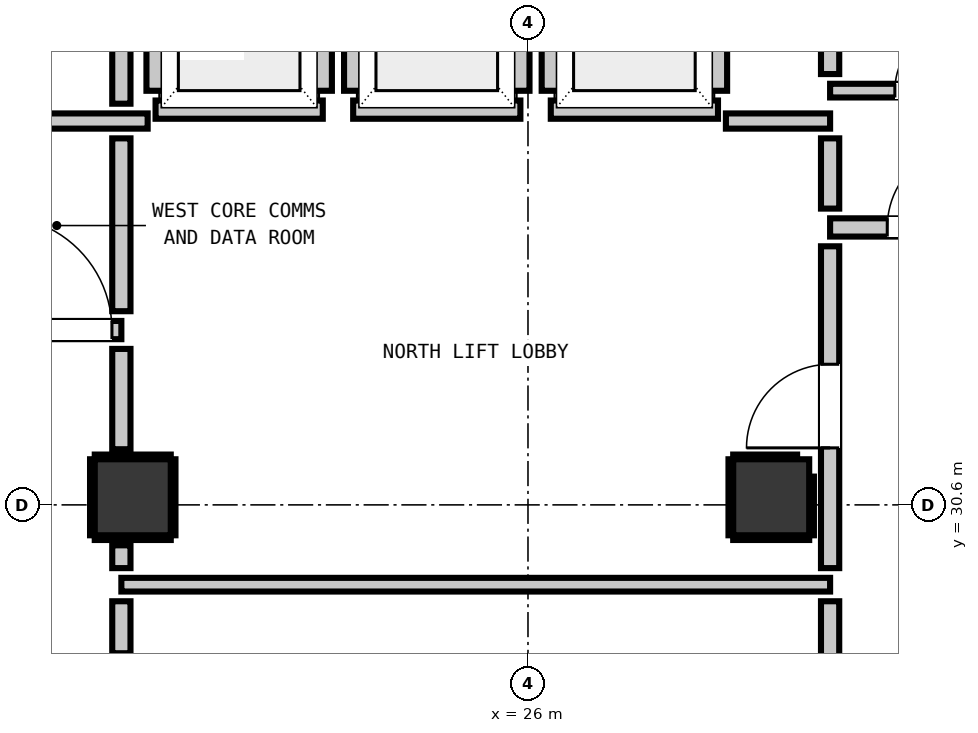
"""IFC4 building model, lengths in metres.
Left out: names, types, materials, properties, quantities, classifications, styles, units other than length and angle.
Written with IfcOpenShell. Run it as: python <this file> out.ifc"""

import sys

from ifc_helpers import new_model, si_unit, direction, frame, frame_2d, origin, origin_2d, place, context, subcontext, project, spatial, rectangle, extrude, element, fill, save


model = new_model("IFC4")
c1 = context("Model", 3, precision=1e-05, world=origin(), true_north=direction((0.0, 1.0)))
c2 = subcontext(c1, "Body", "Model", "MODEL_VIEW")
j1 = project(units=[si_unit("LENGTHUNIT", "METRE"), si_unit("PLANEANGLEUNIT", "RADIAN")], contexts=[c1])
p1 = place(None, origin())
s1 = spatial("IfcSite", under=j1, at=p1, CompositionType="ELEMENT")
p2 = place(p1, origin())
s2 = spatial("IfcBuilding", under=s1, at=p2, CompositionType="ELEMENT")
p3 = place(p2, frame((0.0, 0.0, 22.0)))
s3 = spatial("IfcBuildingStorey", under=s2, at=p3, CompositionType="ELEMENT", Elevation=22.0)
for number, where, z_axis, x_axis in (
    (1, (20.8, 30.7, 0.0), (0.0, 0.0, 1.0), (1.0, 0.0, 0.0)),
    (2, (29.2, 30.7, 0.0), (0.0, 0.0, 1.0), (1.0, 0.0, 0.0)),
):
    element("IfcColumn", number, at=place(p3, frame(where, z_axis=z_axis, x_axis=x_axis)), inside=s3, PredefinedType="COLUMN", context=c2, shape_type="SweptSolid", body=[
        extrude(rectangle(XDim=1.0, YDim=1.0, at=origin_2d()), origin(), (0.0, 0.0, 1.0), 3.32),
    ])
p4 = place(p3, frame((21.1, 35.8, 0.0), z_axis=(0.0, 0.0, 1.0), x_axis=(1.0, 0.0, 0.0)))
e3 = element("IfcWall", 3, at=p4, inside=s3, PredefinedType="PARTITIONING", context=c2, shape_type="SweptSolid", body=[
    extrude(rectangle(XDim=2.2, YDim=0.24, at=frame_2d((1.1, 0.0))), origin(), (0.0, 0.0, 1.0), 3.06),
])
p5 = place(p3, frame((21.1, 36.048, 0.0), z_axis=(0.0, 0.0, 1.0), x_axis=(0.0, 1.0, 0.0)))
e4 = element("IfcWall", 4, at=p5, inside=s3, PredefinedType="PARTITIONING", context=c2, shape_type="SweptSolid", body=[
    extrude(rectangle(XDim=2.104, YDim=0.24, at=frame_2d((1.052, 0.0))), origin(), (0.0, 0.0, 1.0), 2.295),
])
p6 = place(p3, frame((23.3, 36.048, 0.0), z_axis=(0.0, 0.0, 1.0), x_axis=(0.0, 1.0, 0.0)))
e5 = element("IfcWall", 5, at=p6, inside=s3, PredefinedType="PARTITIONING", context=c2, shape_type="SweptSolid", body=[
    extrude(rectangle(XDim=2.104, YDim=0.24, at=frame_2d((1.052, 0.0))), origin(), (0.0, 0.0, 1.0), 3.06),
])
p7 = place(p3, frame((23.7, 35.8, 0.0), z_axis=(0.0, 0.0, 1.0), x_axis=(1.0, 0.0, 0.0)))
e6 = element("IfcWall", 6, at=p7, inside=s3, PredefinedType="PARTITIONING", context=c2, shape_type="SweptSolid", body=[
    extrude(rectangle(XDim=2.2, YDim=0.24, at=frame_2d((1.1, 0.0))), origin(), (0.0, 0.0, 1.0), 3.06),
])
for number, where, z_axis, x_axis in (
    (7, (23.7, 36.048, 0.0), (0.0, 0.0, 1.0), (0.0, 1.0, 0.0)),
    (8, (25.9, 36.048, 0.0), (0.0, 0.0, 1.0), (0.0, 1.0, 0.0)),
):
    element("IfcWall", number, at=place(p3, frame(where, z_axis=z_axis, x_axis=x_axis)), inside=s3, PredefinedType="PARTITIONING", context=c2, shape_type="SweptSolid", body=[
        extrude(rectangle(XDim=2.104, YDim=0.24, at=frame_2d((1.052, 0.0))), origin(), (0.0, 0.0, 1.0), 3.06),
    ])
p8 = place(p3, frame((26.3, 35.8, 0.0), z_axis=(0.0, 0.0, 1.0), x_axis=(1.0, 0.0, 0.0)))
e9 = element("IfcWall", 9, at=p8, inside=s3, PredefinedType="PARTITIONING", context=c2, shape_type="SweptSolid", body=[
    extrude(rectangle(XDim=2.2, YDim=0.24, at=frame_2d((1.1, 0.0))), origin(), (0.0, 0.0, 1.0), 3.06),
])
for number, where, z_axis, x_axis in (
    (10, (26.3, 36.048, 0.0), (0.0, 0.0, 1.0), (0.0, 1.0, 0.0)),
    (11, (28.5, 36.048, 0.0), (0.0, 0.0, 1.0), (0.0, 1.0, 0.0)),
):
    element("IfcWall", number, at=place(p3, frame(where, z_axis=z_axis, x_axis=x_axis)), inside=s3, PredefinedType="PARTITIONING", context=c2, shape_type="SweptSolid", body=[
        extrude(rectangle(XDim=2.104, YDim=0.24, at=frame_2d((1.052, 0.0))), origin(), (0.0, 0.0, 1.0), 3.06),
    ])
p9 = place(p3, frame((17.45, 32.9, 0.0), z_axis=(0.0, 0.0, 1.0), x_axis=(1.0, 0.0, 0.0)))
e12 = element("IfcWall", 12, at=p9, inside=s3, PredefinedType="PARTITIONING", context=c2, shape_type="SweptSolid", body=[
    extrude(rectangle(XDim=3.2, YDim=0.24, at=frame_2d((1.6, 0.0))), origin(), (0.0, 0.0, 1.0), 3.06),
])
p10 = place(p9, frame((0.159, 0.0, 0.0)))
e13 = element("IfcOpeningElement", 13, at=p10, cuts=e12, PredefinedType="OPENING", context=c2, shape_type="SweptSolid", body=[
    extrude(rectangle(XDim=1.1, YDim=2.15, at=frame_2d((0.55, 1.075))), frame((0.0, 0.13, 0.0), z_axis=(0.0, -1.0, 0.0), x_axis=(1.0, 0.0, 0.0)), (0.0, 0.0, 1.0), 0.26),
])
p11 = place(p9, frame((1.576, 0.0, 0.0)))
e14 = element("IfcOpeningElement", 14, at=p11, cuts=e12, PredefinedType="OPENING", context=c2, shape_type="SweptSolid", body=[
    extrude(rectangle(XDim=1.5, YDim=2.15, at=frame_2d((0.75, 1.075))), frame((0.0, 0.13, 0.0), z_axis=(0.0, -1.0, 0.0), x_axis=(1.0, 0.0, 0.0)), (0.0, 0.0, 1.0), 0.26),
])
p12 = place(p3, frame((29.975, 34.25, 0.0), z_axis=(0.0, 0.0, 1.0), x_axis=(1.0, 0.0, 0.0)))
e15 = element("IfcWall", 15, at=p12, inside=s3, PredefinedType="PARTITIONING", context=c2, shape_type="SweptSolid", body=[
    extrude(rectangle(XDim=2.475, YDim=0.24, at=frame_2d((1.237, 0.0))), origin(), (0.0, 0.0, 1.0), 3.06),
])
p13 = place(p12, frame((0.752, 0.0, 0.0)))
e16 = element("IfcOpeningElement", 16, at=p13, cuts=e15, PredefinedType="OPENING", context=c2, shape_type="SweptSolid", body=[
    extrude(rectangle(XDim=1.1, YDim=2.15, at=frame_2d((0.55, 1.075))), frame((0.0, 0.13, 0.0), z_axis=(0.0, -1.0, 0.0), x_axis=(1.0, 0.0, 0.0)), (0.0, 0.0, 1.0), 0.26),
])
p14 = place(p3, frame((18.95, 35.65, 0.0), z_axis=(0.0, 0.0, 1.0), x_axis=(1.0, 0.0, 0.0)))
e17 = element("IfcWall", 17, at=p14, inside=s3, PredefinedType="PARTITIONING", context=c2, shape_type="SweptSolid", body=[
    extrude(rectangle(XDim=2.046, YDim=0.2, at=frame_2d((1.023, 0.0))), origin(), (0.0, 0.0, 1.0), 3.06),
])
p15 = place(p3, frame((28.604, 35.65, 0.0), z_axis=(0.0, 0.0, 1.0), x_axis=(1.0, 0.0, 0.0)))
e18 = element("IfcWall", 18, at=p15, inside=s3, PredefinedType="PARTITIONING", context=c2, shape_type="SweptSolid", body=[
    extrude(rectangle(XDim=1.371, YDim=0.2, at=frame_2d((0.686, 0.0))), origin(), (0.0, 0.0, 1.0), 3.06),
])
p16 = place(p3, frame((20.65, 29.55, 0.0), z_axis=(0.0, 0.0, 1.0), x_axis=(1.0, 0.0, 0.0)))
e19 = element("IfcWall", 19, at=p16, inside=s3, PredefinedType="PARTITIONING", context=c2, shape_type="SweptSolid", body=[
    extrude(rectangle(XDim=9.325, YDim=0.18, at=frame_2d((4.663, 0.0))), origin(), (0.0, 0.0, 1.0), 3.06),
])
p17 = place(p3, frame((29.975, 36.05, 0.0), z_axis=(0.0, 0.0, 1.0), x_axis=(1.0, 0.0, 0.0)))
e20 = element("IfcWall", 20, at=p17, inside=s3, PredefinedType="PARTITIONING", context=c2, shape_type="SweptSolid", body=[
    extrude(rectangle(XDim=2.505, YDim=0.18, at=frame_2d((1.252, 0.0))), origin(), (0.0, 0.0, 1.0), 3.06),
])
p18 = place(p17, frame((0.852, 0.0, 0.0)))
e21 = element("IfcOpeningElement", 21, at=p18, cuts=e20, PredefinedType="OPENING", context=c2, shape_type="SweptSolid", body=[
    extrude(rectangle(XDim=0.9, YDim=2.1, at=frame_2d((0.45, 1.05))), frame((0.0, 0.1, 0.0), z_axis=(0.0, -1.0, 0.0), x_axis=(1.0, 0.0, 0.0)), (0.0, 0.0, 1.0), 0.2),
])
p19 = place(p3, frame((20.65, 28.648, 0.0), z_axis=(0.0, 0.0, 1.0), x_axis=(0.0, 1.0, 0.0)))
e22 = element("IfcWall", 22, at=p19, inside=s3, PredefinedType="PARTITIONING", context=c2, shape_type="SweptSolid", body=[
    extrude(rectangle(XDim=0.684, YDim=0.24, at=frame_2d((0.342, 0.0))), origin(), (0.0, 0.0, 1.0), 2.295),
])
p20 = place(p3, frame((20.65, 29.768, 0.0), z_axis=(0.0, 0.0, 1.0), x_axis=(0.0, 1.0, 0.0)))
e23 = element("IfcWall", 23, at=p20, inside=s3, PredefinedType="PARTITIONING", context=c2, shape_type="SweptSolid", body=[
    extrude(rectangle(XDim=0.3, YDim=0.24, at=frame_2d((0.15, 0.0))), origin(), (0.0, 0.0, 1.0), 2.295),
])
p21 = place(p3, frame((20.65, 31.332, 0.0), z_axis=(0.0, 0.0, 1.0), x_axis=(0.0, 1.0, 0.0)))
e24 = element("IfcWall", 24, at=p21, inside=s3, PredefinedType="PARTITIONING", context=c2, shape_type="SweptSolid", body=[
    extrude(rectangle(XDim=1.32, YDim=0.24, at=frame_2d((0.66, 0.0))), origin(), (0.0, 0.0, 1.0), 2.295),
])
p22 = place(p3, frame((20.65, 33.148, 0.0), z_axis=(0.0, 0.0, 1.0), x_axis=(0.0, 1.0, 0.0)))
e25 = element("IfcWall", 25, at=p22, inside=s3, PredefinedType="PARTITIONING", context=c2, shape_type="SweptSolid", body=[
    extrude(rectangle(XDim=2.274, YDim=0.24, at=frame_2d((1.137, 0.0))), origin(), (0.0, 0.0, 1.0), 2.295),
])
p23 = place(p3, frame((20.65, 35.878, 0.0), z_axis=(0.0, 0.0, 1.0), x_axis=(0.0, 1.0, 0.0)))
e26 = element("IfcWall", 26, at=p23, inside=s3, PredefinedType="PARTITIONING", context=c2, shape_type="SweptSolid", body=[
    extrude(rectangle(XDim=2.674, YDim=0.24, at=frame_2d((1.337, 0.0))), origin(), (0.0, 0.0, 1.0), 2.295),
])
p24 = place(p3, frame((29.975, 25.648, 0.0), z_axis=(0.0, 0.0, 1.0), x_axis=(0.0, 1.0, 0.0)))
e27 = element("IfcWall", 27, at=p24, inside=s3, PredefinedType="PARTITIONING", context=c2, shape_type="SweptSolid", body=[
    extrude(rectangle(XDim=3.684, YDim=0.24, at=frame_2d((1.842, 0.0))), origin(), (0.0, 0.0, 1.0), 3.06),
])
p25 = place(p3, frame((29.975, 29.768, 0.0), z_axis=(0.0, 0.0, 1.0), x_axis=(0.0, 1.0, 0.0)))
e28 = element("IfcWall", 28, at=p25, inside=s3, PredefinedType="PARTITIONING", context=c2, shape_type="SweptSolid", body=[
    extrude(rectangle(XDim=4.234, YDim=0.24, at=frame_2d((2.117, 0.0))), origin(), (0.0, 0.0, 1.0), 3.06),
])
p26 = place(p25, frame((1.582, 0.0, 0.0)))
e29 = element("IfcOpeningElement", 29, at=p26, cuts=e28, PredefinedType="OPENING", context=c2, shape_type="SweptSolid", body=[
    extrude(rectangle(XDim=1.1, YDim=2.15, at=frame_2d((0.55, 1.075))), frame((0.0, 0.13, 0.0), z_axis=(0.0, -1.0, 0.0), x_axis=(1.0, 0.0, 0.0)), (0.0, 0.0, 1.0), 0.26),
])
p27 = place(p3, frame((29.975, 34.498, 0.0), z_axis=(0.0, 0.0, 1.0), x_axis=(0.0, 1.0, 0.0)))
e30 = element("IfcWall", 30, at=p27, inside=s3, PredefinedType="PARTITIONING", context=c2, shape_type="SweptSolid", body=[
    extrude(rectangle(XDim=0.924, YDim=0.24, at=frame_2d((0.462, 0.0))), origin(), (0.0, 0.0, 1.0), 3.06),
])
p28 = place(p3, frame((29.975, 36.268, 0.0), z_axis=(0.0, 0.0, 1.0), x_axis=(0.0, 1.0, 0.0)))
e31 = element("IfcWall", 31, at=p28, inside=s3, PredefinedType="PARTITIONING", context=c2, shape_type="SweptSolid", body=[
    extrude(rectangle(XDim=2.284, YDim=0.24, at=frame_2d((1.142, 0.0))), origin(), (0.0, 0.0, 1.0), 3.06),
])
for number, where, z_axis, x_axis in (
    (32, (20.3, 30.168, 0.0), (0.0, 0.0, 1.0), (1.0, 0.0, 0.0)),
    (33, (20.3, 31.232, 0.0), (0.0, 0.0, 1.0), (1.0, 0.0, 0.0)),
    (34, (20.268, 30.2, 0.0), (0.0, 0.0, 1.0), (0.0, 1.0, 0.0)),
    (35, (21.332, 30.2, 0.0), (0.0, 0.0, 1.0), (0.0, 1.0, 0.0)),
    (36, (28.7, 30.168, 0.0), (0.0, 0.0, 1.0), (1.0, 0.0, 0.0)),
):
    element("IfcWall", number, at=place(p3, frame(where, z_axis=z_axis, x_axis=x_axis)), inside=s3, PredefinedType="PARTITIONING", context=c2, shape_type="SweptSolid", body=[
        extrude(rectangle(XDim=1.0, YDim=0.06, at=frame_2d((0.5, 0.0))), origin(), (0.0, 0.0, 1.0), 1.45),
    ])
p29 = place(p3, frame((28.7, 31.232, 0.0), z_axis=(0.0, 0.0, 1.0), x_axis=(1.0, 0.0, 0.0)))
e37 = element("IfcWall", 37, at=p29, inside=s3, PredefinedType="PARTITIONING", context=c2, shape_type="SweptSolid", body=[
    extrude(rectangle(XDim=0.841, YDim=0.06, at=frame_2d((0.42, 0.0))), origin(), (0.0, 0.0, 1.0), 1.45),
])
p30 = place(p3, frame((28.668, 30.2, 0.0), z_axis=(0.0, 0.0, 1.0), x_axis=(0.0, 1.0, 0.0)))
e38 = element("IfcWall", 38, at=p30, inside=s3, PredefinedType="PARTITIONING", context=c2, shape_type="SweptSolid", body=[
    extrude(rectangle(XDim=1.0, YDim=0.06, at=frame_2d((0.5, 0.0))), origin(), (0.0, 0.0, 1.0), 1.45),
])
p31 = place(p3, frame((29.732, 30.2, 0.0), z_axis=(0.0, 0.0, 1.0), x_axis=(0.0, 1.0, 0.0)))
e39 = element("IfcWall", 39, at=p31, inside=s3, PredefinedType="PARTITIONING", context=c2, shape_type="SweptSolid", body=[
    extrude(rectangle(XDim=0.772, YDim=0.06, at=frame_2d((0.386, 0.0))), origin(), (0.0, 0.0, 1.0), 1.45),
])
p32 = place(p26, origin())
e40 = element("IfcDoor", 40, at=p32, inside=s3, OperationType="SINGLE_SWING_LEFT", PredefinedType="DOOR", context=c2, shape_type="SweptSolid", body=[
    extrude(rectangle(XDim=1.1, YDim=2.15, at=frame_2d((0.55, 1.075))), frame((0.0, 0.025, 0.0), z_axis=(0.0, -1.0, 0.0), x_axis=(1.0, 0.0, 0.0)), (0.0, 0.0, 1.0), 0.05),
])
fill(e29, e40)
p33 = place(p13, origin())
e41 = element("IfcDoor", 41, at=p33, inside=s3, OperationType="SINGLE_SWING_RIGHT", PredefinedType="DOOR", context=c2, shape_type="SweptSolid", body=[
    extrude(rectangle(XDim=1.1, YDim=2.15, at=frame_2d((0.55, 1.075))), frame((0.0, 0.025, 0.0), z_axis=(0.0, -1.0, 0.0), x_axis=(1.0, 0.0, 0.0)), (0.0, 0.0, 1.0), 0.05),
])
fill(e16, e41)
p34 = place(p11, origin())
e42 = element("IfcDoor", 42, at=p34, inside=s3, OperationType="SINGLE_SWING_LEFT", PredefinedType="DOOR", context=c2, shape_type="SweptSolid", body=[
    extrude(rectangle(XDim=1.5, YDim=2.15, at=frame_2d((0.75, 1.075))), frame((0.0, 0.025, 0.0), z_axis=(0.0, -1.0, 0.0), x_axis=(1.0, 0.0, 0.0)), (0.0, 0.0, 1.0), 0.05),
])
fill(e14, e42)
p35 = place(p18, origin())
e43 = element("IfcDoor", 43, at=p35, inside=s3, OperationType="SINGLE_SWING_RIGHT", PredefinedType="DOOR", context=c2, shape_type="SweptSolid", body=[
    extrude(rectangle(XDim=0.9, YDim=2.1, at=frame_2d((0.45, 1.05))), frame((0.0, 0.025, 0.0), z_axis=(0.0, -1.0, 0.0), x_axis=(1.0, 0.0, 0.0)), (0.0, 0.0, 1.0), 0.05),
])
fill(e21, e43)
save(model, sys.argv[1])
